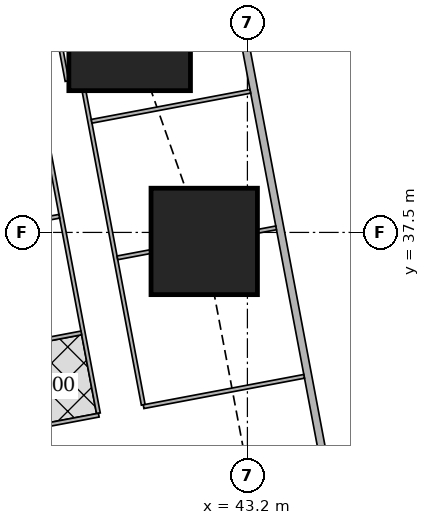
"""IFC4 building model, lengths in metres.
Left out: names, types, materials, properties, quantities, classifications, styles, units other than length and angle.
Written with IfcOpenShell. Run it as: python <this file> out.ifc"""

import sys

from ifc_helpers import new_model, si_unit, direction, frame, frame_2d, origin, origin_2d, place, context, subcontext, project, spatial, rectangle, extrude, element, fill, save


model = new_model("IFC4")
c1 = context("Model", 3, precision=1e-05, world=origin(), true_north=direction((0.0, 1.0)))
c2 = subcontext(c1, "Body", "Model", "MODEL_VIEW")
j1 = project(units=[si_unit("LENGTHUNIT", "METRE"), si_unit("PLANEANGLEUNIT", "RADIAN")], contexts=[c1])
p1 = place(None, origin())
s1 = spatial("IfcSite", under=j1, at=p1, CompositionType="ELEMENT")
p2 = place(p1, origin())
s2 = spatial("IfcBuilding", under=s1, at=p2, CompositionType="ELEMENT")
p3 = place(p2, frame((0.0, 0.0, 31.25)))
s3 = spatial("IfcBuildingStorey", under=s2, at=p3, CompositionType="ELEMENT", Elevation=31.25)
p4 = place(p3, frame((42.064, 37.263, 0.0), z_axis=(0.0, 0.0, 1.0), x_axis=(1.0, 0.0, 0.0)))
e1 = element("IfcColumn", 1, at=p4, inside=s3, PredefinedType="COLUMN", context=c2, shape_type="SweptSolid", body=[
    extrude(rectangle(XDim=2.8, YDim=2.8, at=origin_2d()), origin(), (0.0, 0.0, 1.0), 3.75),
])
p5 = place(p3, frame((40.102, 42.83, 0.0), z_axis=(0.0, 0.0, 1.0), x_axis=(1.0, 0.0, 0.0)))
e2 = element("IfcColumn", 2, at=p5, inside=s3, PredefinedType="COLUMN", context=c2, shape_type="SweptSolid", body=[
    extrude(rectangle(XDim=3.2, YDim=3.2, at=origin_2d()), origin(), (0.0, 0.0, 1.0), 3.75),
])
p6 = place(p3, frame((50.653, 2.703, 0.0), z_axis=(0.0, 0.0, 1.0), x_axis=(-0.185612026696, 0.982623109613, 0.0)))
e3 = element("IfcWall", 3, at=p6, inside=s3, PredefinedType="SOLIDWALL", context=c2, shape_type="SweptSolid", body=[
    extrude(rectangle(XDim=41.393, YDim=0.2, at=frame_2d((20.697, 0.0))), origin(), (0.0, 0.0, 1.0), 3.5),
])
p7 = place(p6, frame((1.633, 0.0, 0.9)))
e4 = element("IfcOpeningElement", 4, at=p7, cuts=e3, PredefinedType="OPENING", context=c2, shape_type="SweptSolid", body=[
    extrude(rectangle(XDim=1.8, YDim=1.5, at=frame_2d((0.9, 0.75))), frame((0.0, 0.11, 0.0), z_axis=(0.0, -1.0, 0.0), x_axis=(1.0, 0.0, 0.0)), (0.0, 0.0, 1.0), 0.22),
])
p8 = place(p6, frame((6.032, 0.0, 0.9)))
e5 = element("IfcOpeningElement", 5, at=p8, cuts=e3, PredefinedType="OPENING", context=c2, shape_type="SweptSolid", body=[
    extrude(rectangle(XDim=1.8, YDim=1.5, at=frame_2d((0.9, 0.75))), frame((0.0, 0.11, 0.0), z_axis=(0.0, -1.0, 0.0), x_axis=(1.0, 0.0, 0.0)), (0.0, 0.0, 1.0), 0.22),
])
p9 = place(p6, frame((9.848, 0.0, 0.9)))
e6 = element("IfcOpeningElement", 6, at=p9, cuts=e3, PredefinedType="OPENING", context=c2, shape_type="SweptSolid", body=[
    extrude(rectangle(XDim=1.8, YDim=1.5, at=frame_2d((0.9, 0.75))), frame((0.0, 0.11, 0.0), z_axis=(0.0, -1.0, 0.0), x_axis=(1.0, 0.0, 0.0)), (0.0, 0.0, 1.0), 0.22),
])
p10 = place(p6, frame((17.481, 0.0, 0.9)))
e7 = element("IfcOpeningElement", 7, at=p10, cuts=e3, PredefinedType="OPENING", context=c2, shape_type="SweptSolid", body=[
    extrude(rectangle(XDim=1.8, YDim=1.5, at=frame_2d((0.9, 0.75))), frame((0.0, 0.11, 0.0), z_axis=(0.0, -1.0, 0.0), x_axis=(1.0, 0.0, 0.0)), (0.0, 0.0, 1.0), 0.22),
])
p11 = place(p6, frame((21.297, 0.0, 0.9)))
e8 = element("IfcOpeningElement", 8, at=p11, cuts=e3, PredefinedType="OPENING", context=c2, shape_type="SweptSolid", body=[
    extrude(rectangle(XDim=1.8, YDim=1.5, at=frame_2d((0.9, 0.75))), frame((0.0, 0.11, 0.0), z_axis=(0.0, -1.0, 0.0), x_axis=(1.0, 0.0, 0.0)), (0.0, 0.0, 1.0), 0.22),
])
p12 = place(p6, frame((25.113, 0.0, 0.9)))
e9 = element("IfcOpeningElement", 9, at=p12, cuts=e3, PredefinedType="OPENING", context=c2, shape_type="SweptSolid", body=[
    extrude(rectangle(XDim=1.8, YDim=1.5, at=frame_2d((0.9, 0.75))), frame((0.0, 0.11, 0.0), z_axis=(0.0, -1.0, 0.0), x_axis=(1.0, 0.0, 0.0)), (0.0, 0.0, 1.0), 0.22),
])
p13 = place(p6, frame((28.93, 0.0, 0.9)))
e10 = element("IfcOpeningElement", 10, at=p13, cuts=e3, PredefinedType="OPENING", context=c2, shape_type="SweptSolid", body=[
    extrude(rectangle(XDim=1.8, YDim=1.5, at=frame_2d((0.9, 0.75))), frame((0.0, 0.11, 0.0), z_axis=(0.0, -1.0, 0.0), x_axis=(1.0, 0.0, 0.0)), (0.0, 0.0, 1.0), 0.22),
])
p14 = place(p6, frame((32.746, 0.0, 0.9)))
e11 = element("IfcOpeningElement", 11, at=p14, cuts=e3, PredefinedType="OPENING", context=c2, shape_type="SweptSolid", body=[
    extrude(rectangle(XDim=1.8, YDim=1.5, at=frame_2d((0.9, 0.75))), frame((0.0, 0.11, 0.0), z_axis=(0.0, -1.0, 0.0), x_axis=(1.0, 0.0, 0.0)), (0.0, 0.0, 1.0), 0.22),
])
p15 = place(p6, frame((36.481, 0.0, 0.9)))
e12 = element("IfcOpeningElement", 12, at=p15, cuts=e3, PredefinedType="OPENING", context=c2, shape_type="SweptSolid", body=[
    extrude(rectangle(XDim=1.8, YDim=1.5, at=frame_2d((0.9, 0.75))), frame((0.0, 0.11, 0.0), z_axis=(0.0, -1.0, 0.0), x_axis=(1.0, 0.0, 0.0)), (0.0, 0.0, 1.0), 0.22),
])
p16 = place(p3, frame((35.094, 36.585, 0.0), z_axis=(0.0, 0.0, 1.0), x_axis=(0.185588860311, -0.982627485331, 0.0)))
e13 = element("IfcWall", 13, at=p16, inside=s3, PredefinedType="SOLIDWALL", context=c2, shape_type="SweptSolid", body=[
    extrude(rectangle(XDim=34.797, YDim=0.15, at=frame_2d((17.399, 0.0))), origin(), (0.0, 0.0, 1.0), 2.5),
])
p17 = place(p16, frame((6.012, 0.0, 0.0)))
e14 = element("IfcOpeningElement", 14, at=p17, cuts=e13, PredefinedType="OPENING", context=c2, shape_type="SweptSolid", body=[
    extrude(rectangle(XDim=1.0, YDim=2.1, at=frame_2d((0.5, 1.05))), frame((0.0, 0.085, 0.0), z_axis=(0.0, -1.0, 0.0), x_axis=(1.0, 0.0, 0.0)), (0.0, 0.0, 1.0), 0.17),
])
p18 = place(p16, frame((9.828, 0.0, 0.0)))
e15 = element("IfcOpeningElement", 15, at=p18, cuts=e13, PredefinedType="OPENING", context=c2, shape_type="SweptSolid", body=[
    extrude(rectangle(XDim=1.0, YDim=2.1, at=frame_2d((0.5, 1.05))), frame((0.0, 0.085, 0.0), z_axis=(0.0, -1.0, 0.0), x_axis=(1.0, 0.0, 0.0)), (0.0, 0.0, 1.0), 0.17),
])
p19 = place(p16, frame((25.9, 0.0, 0.0)))
e16 = element("IfcOpeningElement", 16, at=p19, cuts=e13, PredefinedType="OPENING", context=c2, shape_type="SweptSolid", body=[
    extrude(rectangle(XDim=1.0, YDim=2.1, at=frame_2d((0.5, 1.05))), frame((0.0, 0.085, 0.0), z_axis=(0.0, -1.0, 0.0), x_axis=(1.0, 0.0, 0.0)), (0.0, 0.0, 1.0), 0.17),
])
p20 = place(p3, frame((38.454, 41.483, 0.0), z_axis=(0.0, 0.0, 1.0), x_axis=(-0.185609245326, 0.982623634994, 0.0)))
e17 = element("IfcWall", 17, at=p20, inside=s3, PredefinedType="PARTITIONING", context=c2, shape_type="SweptSolid", body=[
    extrude(rectangle(XDim=4.241, YDim=0.1, at=frame_2d((2.12, 0.0))), origin(), (0.0, 0.0, 1.0), 2.05),
])
p21 = place(p3, frame((38.9, 41.22, 0.0), z_axis=(0.0, 0.0, 1.0), x_axis=(0.18556562412, -0.982631873666, 0.0)))
e18 = element("IfcWall", 18, at=p21, inside=s3, PredefinedType="PARTITIONING", context=c2, shape_type="SweptSolid", body=[
    extrude(rectangle(XDim=8.402, YDim=0.1, at=frame_2d((4.201, 0.0))), origin(), (0.0, 0.0, 1.0), 3.5),
])
p22 = place(p21, frame((7.352, 0.0, 0.0)))
e19 = element("IfcOpeningElement", 19, at=p22, cuts=e18, PredefinedType="OPENING", context=c2, shape_type="SweptSolid", body=[
    extrude(rectangle(XDim=0.9, YDim=2.1, at=frame_2d((0.45, 1.05))), frame((0.0, 0.06, 0.0), z_axis=(0.0, -1.0, 0.0), x_axis=(1.0, 0.0, 0.0)), (0.0, 0.0, 1.0), 0.12),
])
p23 = place(p21, frame((1.9, 0.0, 0.0)))
e20 = element("IfcOpeningElement", 20, at=p23, cuts=e18, PredefinedType="OPENING", context=c2, shape_type="SweptSolid", body=[
    extrude(rectangle(XDim=0.9, YDim=2.1, at=frame_2d((0.45, 1.05))), frame((0.0, 0.06, 0.0), z_axis=(0.0, -1.0, 0.0), x_axis=(1.0, 0.0, 0.0)), (0.0, 0.0, 1.0), 0.12),
])
p24 = place(p3, frame((37.514, 42.089, 0.0), z_axis=(0.0, 0.0, 1.0), x_axis=(0.185543450498, -0.982636060796, 0.0)))
e21 = element("IfcWall", 21, at=p24, inside=s3, PredefinedType="PARTITIONING", context=c2, shape_type="SweptSolid", body=[
    extrude(rectangle(XDim=9.513, YDim=0.1, at=frame_2d((4.757, 0.0))), origin(), (0.0, 0.0, 1.0), 3.5),
])
p25 = place(p24, frame((8.008, 0.0, 0.0)))
e22 = element("IfcOpeningElement", 22, at=p25, cuts=e21, PredefinedType="OPENING", context=c2, shape_type="SweptSolid", body=[
    extrude(rectangle(XDim=0.9, YDim=2.1, at=frame_2d((0.45, 1.05))), frame((0.0, 0.06, 0.0), z_axis=(0.0, -1.0, 0.0), x_axis=(1.0, 0.0, 0.0)), (0.0, 0.0, 1.0), 0.12),
])
p26 = place(p24, frame((2.63, 0.0, 0.0)))
e23 = element("IfcOpeningElement", 23, at=p26, cuts=e21, PredefinedType="OPENING", context=c2, shape_type="SweptSolid", body=[
    extrude(rectangle(XDim=0.9, YDim=2.1, at=frame_2d((0.45, 1.05))), frame((0.0, 0.06, 0.0), z_axis=(0.0, -1.0, 0.0), x_axis=(1.0, 0.0, 0.0)), (0.0, 0.0, 1.0), 0.12),
])
p27 = place(p24, frame((5.341, 0.0, 0.0)))
e24 = element("IfcOpeningElement", 24, at=p27, cuts=e21, PredefinedType="OPENING", context=c2, shape_type="SweptSolid", body=[
    extrude(rectangle(XDim=0.9, YDim=2.1, at=frame_2d((0.45, 1.05))), frame((0.0, 0.06, 0.0), z_axis=(0.0, -1.0, 0.0), x_axis=(1.0, 0.0, 0.0)), (0.0, 0.0, 1.0), 0.12),
])
p28 = place(p3, frame((43.277, 41.212, 0.0), z_axis=(0.0, 0.0, 1.0), x_axis=(-0.982665405803, -0.185387972203, 0.0)))
e25 = element("IfcWall", 25, at=p28, inside=s3, PredefinedType="PARTITIONING", context=c2, shape_type="SweptSolid", body=[
    extrude(rectangle(XDim=4.25, YDim=0.1, at=frame_2d((2.125, 0.0))), origin(), (0.0, 0.0, 1.0), 2.05),
])
p29 = place(p3, frame((43.955, 37.62, 0.0), z_axis=(0.0, 0.0, 1.0), x_axis=(-0.982543152073, -0.186034820164, 0.0)))
e26 = element("IfcWall", 26, at=p29, inside=s3, PredefinedType="PARTITIONING", context=c2, shape_type="SweptSolid", body=[
    extrude(rectangle(XDim=0.49, YDim=0.1, at=frame_2d((0.245, 0.0))), origin(), (0.0, 0.0, 1.0), 3.5),
])
p30 = place(p3, frame((40.654, 36.996, 0.0), z_axis=(0.0, 0.0, 1.0), x_axis=(-0.982672962335, -0.185347913655, 0.0)))
e27 = element("IfcWall", 27, at=p30, inside=s3, PredefinedType="PARTITIONING", context=c2, shape_type="SweptSolid", body=[
    extrude(rectangle(XDim=0.89, YDim=0.1, at=frame_2d((0.445, 0.0))), origin(), (0.0, 0.0, 1.0), 3.5),
])
p31 = place(p3, frame((44.693, 33.713, 0.0), z_axis=(0.0, 0.0, 1.0), x_axis=(-0.982633535512, -0.185556823879, 0.0)))
e28 = element("IfcWall", 28, at=p31, inside=s3, PredefinedType="PARTITIONING", context=c2, shape_type="SweptSolid", body=[
    extrude(rectangle(XDim=4.3, YDim=0.1, at=frame_2d((2.15, 0.0))), origin(), (0.0, 0.0, 1.0), 2.05),
])
p32 = place(p3, frame((38.25, 37.925, 0.0), z_axis=(0.0, 0.0, 1.0), x_axis=(-0.982650574676, -0.185466568658, 0.0)))
e29 = element("IfcWall", 29, at=p32, inside=s3, PredefinedType="PARTITIONING", context=c2, shape_type="SweptSolid", body=[
    extrude(rectangle(XDim=1.364, YDim=0.1, at=frame_2d((0.682, 0.0))), origin(), (0.0, 0.0, 1.0), 3.5),
])
p33 = place(p3, frame((39.289, 32.692, 0.0), z_axis=(0.0, 0.0, 1.0), x_axis=(-0.982633623707, -0.185556356831, 0.0)))
e30 = element("IfcWall", 30, at=p33, inside=s3, PredefinedType="PARTITIONING", context=c2, shape_type="SweptSolid", body=[
    extrude(rectangle(XDim=3.325, YDim=0.1, at=frame_2d((1.663, 0.0))), origin(), (0.0, 0.0, 1.0), 3.5),
])
p34 = place(p3, frame((38.829, 34.855, 0.0), z_axis=(0.0, 0.0, 1.0), x_axis=(-0.982610347627, -0.185679575441, 0.0)))
e31 = element("IfcWall", 31, at=p34, inside=s3, PredefinedType="PARTITIONING", context=c2, shape_type="SweptSolid", body=[
    extrude(rectangle(XDim=3.274, YDim=0.1, at=frame_2d((1.637, 0.0))), origin(), (0.0, 0.0, 1.0), 3.5),
])
p35 = place(p3, frame((38.202, 10.163, 0.0), z_axis=(0.0, 0.0, 1.0), x_axis=(-0.185610321132, 0.982623431783, 0.0)))
e32 = element("IfcWall", 32, at=p35, inside=s3, PredefinedType="PARTITIONING", context=c2, shape_type="SweptSolid", body=[
    extrude(rectangle(XDim=25.111, YDim=0.125, at=frame_2d((12.556, 0.0))), origin(), (0.0, 0.0, 1.0), 2.5),
])
p36 = place(p35, frame((0.708, 0.0, 0.0)))
e33 = element("IfcOpeningElement", 33, at=p36, cuts=e32, PredefinedType="OPENING", context=c2, shape_type="SweptSolid", body=[
    extrude(rectangle(XDim=1.0, YDim=2.1, at=frame_2d((0.5, 1.05))), frame((0.0, 0.073, 0.0), z_axis=(0.0, -1.0, 0.0), x_axis=(1.0, 0.0, 0.0)), (0.0, 0.0, 1.0), 0.145),
])
p37 = place(p35, frame((6.1, 0.0, 0.0)))
e34 = element("IfcOpeningElement", 34, at=p37, cuts=e32, PredefinedType="OPENING", context=c2, shape_type="SweptSolid", body=[
    extrude(rectangle(XDim=1.0, YDim=2.1, at=frame_2d((0.5, 1.05))), frame((0.0, 0.073, 0.0), z_axis=(0.0, -1.0, 0.0), x_axis=(1.0, 0.0, 0.0)), (0.0, 0.0, 1.0), 0.145),
])
p38 = place(p35, frame((13.378, 0.0, 0.0)))
e35 = element("IfcOpeningElement", 35, at=p38, cuts=e32, PredefinedType="OPENING", context=c2, shape_type="SweptSolid", body=[
    extrude(rectangle(XDim=1.0, YDim=2.1, at=frame_2d((0.5, 1.05))), frame((0.0, 0.073, 0.0), z_axis=(0.0, -1.0, 0.0), x_axis=(1.0, 0.0, 0.0)), (0.0, 0.0, 1.0), 0.145),
])
p39 = place(p35, frame((17.194, 0.0, 0.0)))
e36 = element("IfcOpeningElement", 36, at=p39, cuts=e32, PredefinedType="OPENING", context=c2, shape_type="SweptSolid", body=[
    extrude(rectangle(XDim=1.0, YDim=2.1, at=frame_2d((0.5, 1.05))), frame((0.0, 0.073, 0.0), z_axis=(0.0, -1.0, 0.0), x_axis=(1.0, 0.0, 0.0)), (0.0, 0.0, 1.0), 0.145),
])
p40 = place(p35, frame((21.35, 0.0, 0.0)))
e37 = element("IfcOpeningElement", 37, at=p40, cuts=e32, PredefinedType="OPENING", context=c2, shape_type="SweptSolid", body=[
    extrude(rectangle(XDim=1.0, YDim=2.1, at=frame_2d((0.5, 1.05))), frame((0.0, 0.073, 0.0), z_axis=(0.0, -1.0, 0.0), x_axis=(1.0, 0.0, 0.0)), (0.0, 0.0, 1.0), 0.145),
])
p41 = place(p13, origin())
e38 = element("IfcWindow", 38, at=p41, inside=s3, PartitioningType="SINGLE_PANEL", PredefinedType="WINDOW", context=c2, shape_type="SweptSolid", body=[
    extrude(rectangle(XDim=1.8, YDim=1.5, at=frame_2d((0.9, 0.75))), frame((0.0, 0.03, 0.0), z_axis=(0.0, -1.0, 0.0), x_axis=(1.0, 0.0, 0.0)), (0.0, 0.0, 1.0), 0.06),
])
fill(e10, e38)
p42 = place(p14, origin())
e39 = element("IfcWindow", 39, at=p42, inside=s3, PartitioningType="SINGLE_PANEL", PredefinedType="WINDOW", context=c2, shape_type="SweptSolid", body=[
    extrude(rectangle(XDim=1.8, YDim=1.5, at=frame_2d((0.9, 0.75))), frame((0.0, 0.03, 0.0), z_axis=(0.0, -1.0, 0.0), x_axis=(1.0, 0.0, 0.0)), (0.0, 0.0, 1.0), 0.06),
])
fill(e11, e39)
p43 = place(p15, origin())
e40 = element("IfcWindow", 40, at=p43, inside=s3, PartitioningType="SINGLE_PANEL", PredefinedType="WINDOW", context=c2, shape_type="SweptSolid", body=[
    extrude(rectangle(XDim=1.8, YDim=1.5, at=frame_2d((0.9, 0.75))), frame((0.0, 0.03, 0.0), z_axis=(0.0, -1.0, 0.0), x_axis=(1.0, 0.0, 0.0)), (0.0, 0.0, 1.0), 0.06),
])
fill(e12, e40)
p44 = place(p22, origin())
e41 = element("IfcDoor", 41, at=p44, inside=s3, OperationType="SINGLE_SWING_RIGHT", PredefinedType="DOOR", context=c2, shape_type="SweptSolid", body=[
    extrude(rectangle(XDim=0.9, YDim=2.1, at=frame_2d((0.45, 1.05))), frame((0.0, 0.025, 0.0), z_axis=(0.0, -1.0, 0.0), x_axis=(1.0, 0.0, 0.0)), (0.0, 0.0, 1.0), 0.05),
])
fill(e19, e41)
p45 = place(p23, origin())
e42 = element("IfcDoor", 42, at=p45, inside=s3, OperationType="SINGLE_SWING_LEFT", PredefinedType="DOOR", context=c2, shape_type="SweptSolid", body=[
    extrude(rectangle(XDim=0.9, YDim=2.1, at=frame_2d((0.45, 1.05))), frame((0.0, 0.025, 0.0), z_axis=(0.0, -1.0, 0.0), x_axis=(1.0, 0.0, 0.0)), (0.0, 0.0, 1.0), 0.05),
])
fill(e20, e42)
p46 = place(p25, origin())
e43 = element("IfcDoor", 43, at=p46, inside=s3, OperationType="SINGLE_SWING_LEFT", PredefinedType="DOOR", context=c2, shape_type="SweptSolid", body=[
    extrude(rectangle(XDim=0.9, YDim=2.1, at=frame_2d((0.45, 1.05))), frame((0.0, 0.025, 0.0), z_axis=(0.0, -1.0, 0.0), x_axis=(1.0, 0.0, 0.0)), (0.0, 0.0, 1.0), 0.05),
])
fill(e22, e43)
p47 = place(p26, origin())
e44 = element("IfcDoor", 44, at=p47, inside=s3, OperationType="SINGLE_SWING_LEFT", PredefinedType="DOOR", context=c2, shape_type="SweptSolid", body=[
    extrude(rectangle(XDim=0.9, YDim=2.1, at=frame_2d((0.45, 1.05))), frame((0.0, 0.025, 0.0), z_axis=(0.0, -1.0, 0.0), x_axis=(1.0, 0.0, 0.0)), (0.0, 0.0, 1.0), 0.05),
])
fill(e23, e44)
p48 = place(p27, origin())
e45 = element("IfcDoor", 45, at=p48, inside=s3, OperationType="SINGLE_SWING_LEFT", PredefinedType="DOOR", context=c2, shape_type="SweptSolid", body=[
    extrude(rectangle(XDim=0.9, YDim=2.1, at=frame_2d((0.45, 1.05))), frame((0.0, 0.025, 0.0), z_axis=(0.0, -1.0, 0.0), x_axis=(1.0, 0.0, 0.0)), (0.0, 0.0, 1.0), 0.05),
])
fill(e24, e45)
save(model, sys.argv[1])
